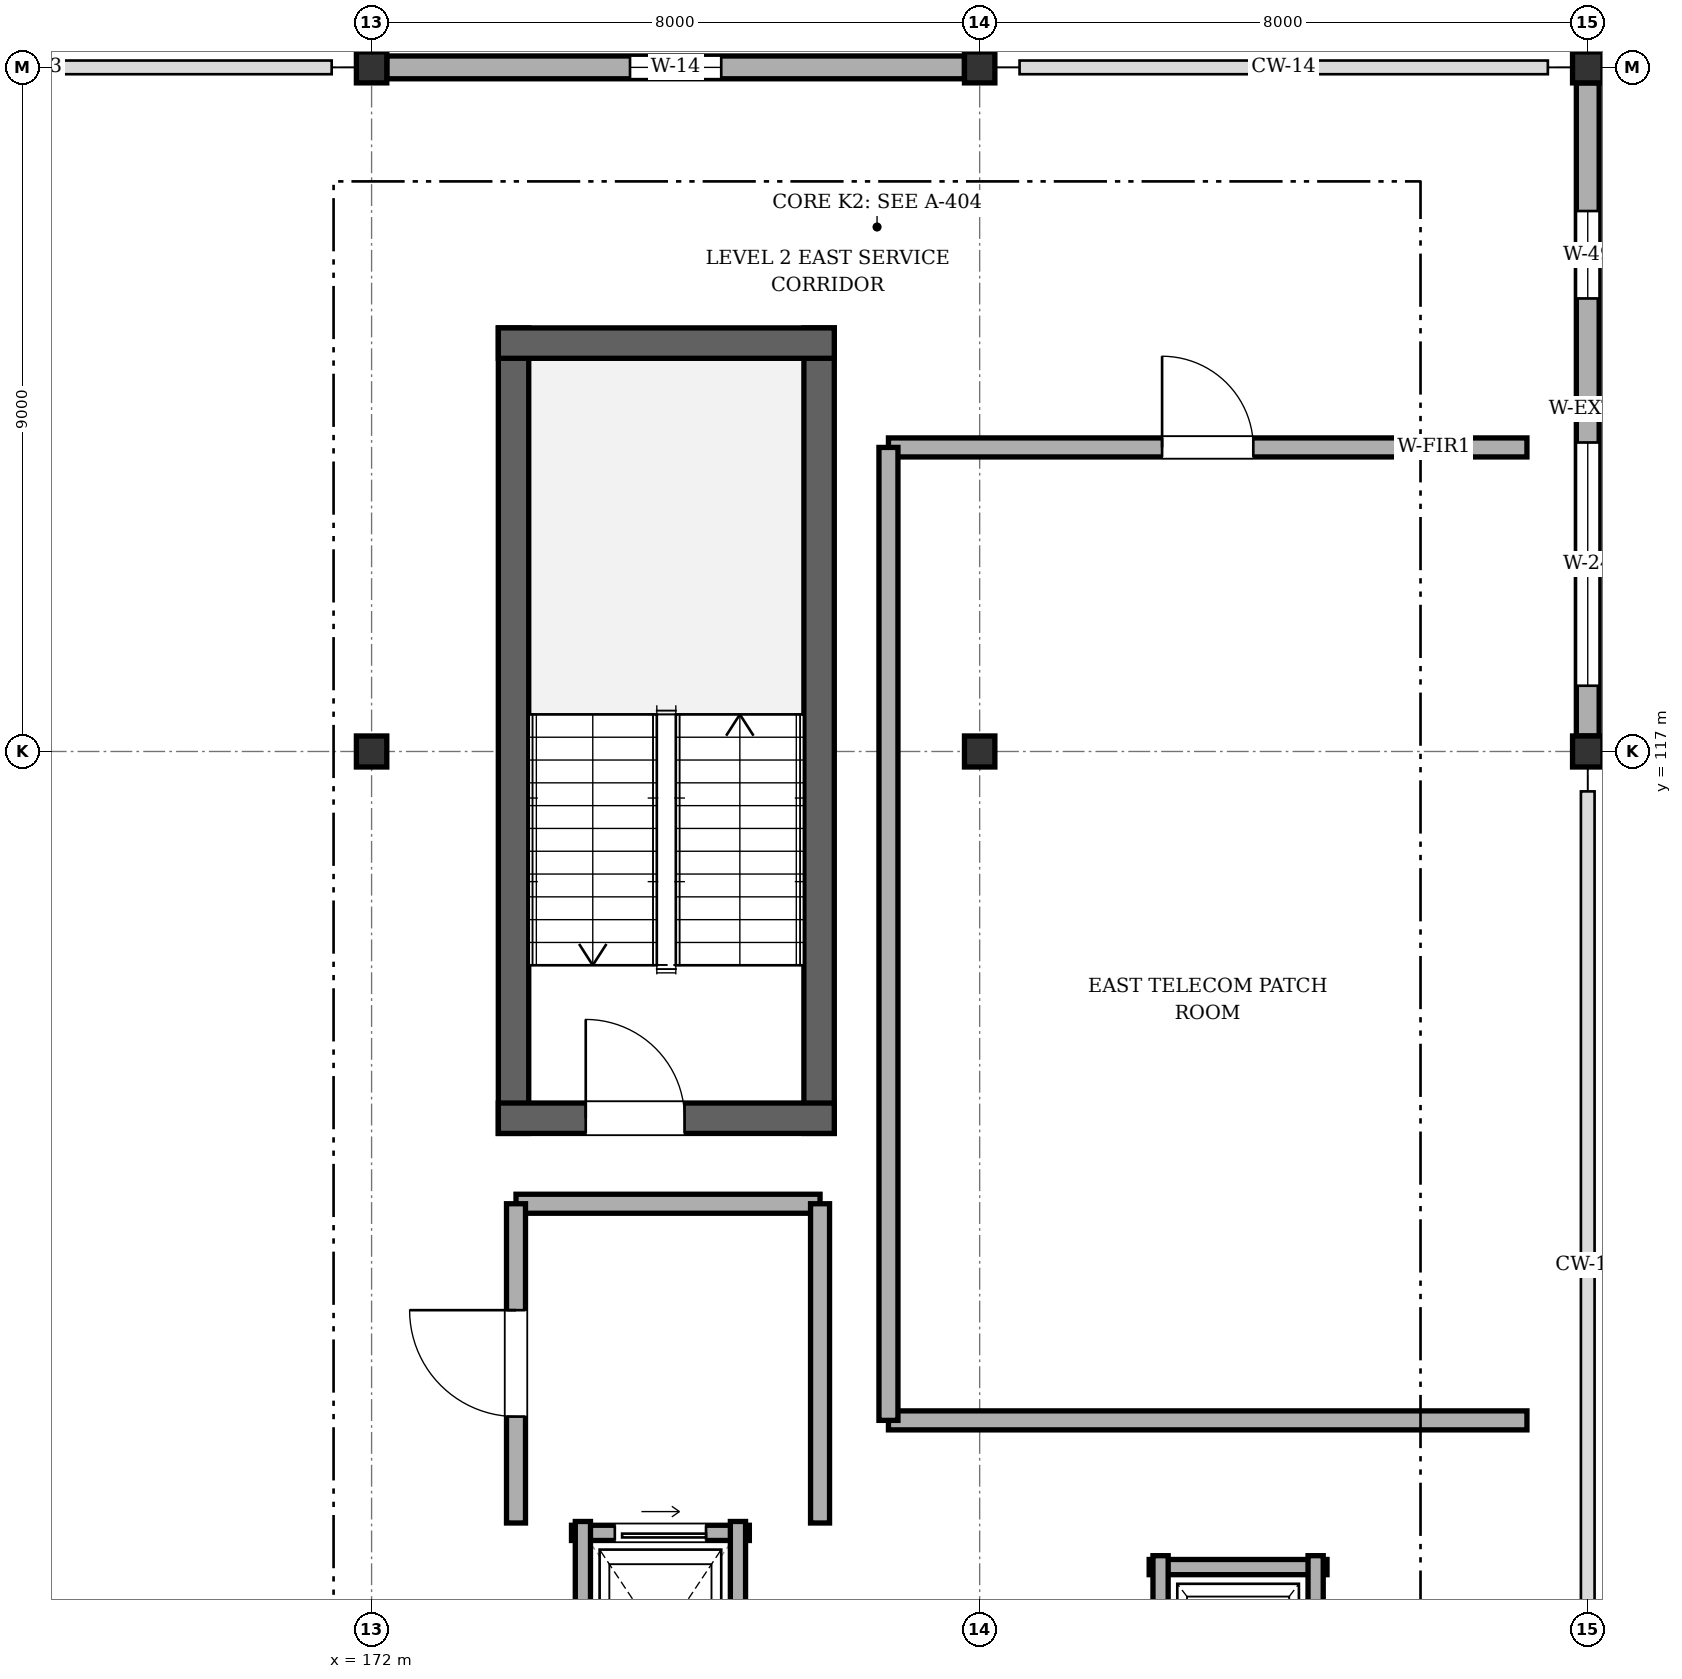
"""IFC4 building model, lengths in metres.
Left out: names, types, materials, properties, quantities, classifications, styles, units other than length and angle.
Written with IfcOpenShell. Run it as: python <this file> out.ifc"""

import sys

from ifc_helpers import new_model, si_unit, direction, frame, frame_2d, origin, origin_2d, place, context, subcontext, project, spatial, rectangle, i_section, extrude, element, fill, save


model = new_model("IFC4")
c1 = context("Model", 3, precision=1e-05, world=origin(), true_north=direction((0.0, 1.0)))
c2 = subcontext(c1, "Body", "Model", "MODEL_VIEW")
j1 = project(units=[si_unit("LENGTHUNIT", "METRE"), si_unit("PLANEANGLEUNIT", "RADIAN")], contexts=[c1])
p1 = place(None, origin())
s1 = spatial("IfcSite", under=j1, at=p1, CompositionType="ELEMENT")
p2 = place(p1, origin())
s2 = spatial("IfcBuilding", under=s1, at=p2, CompositionType="ELEMENT")
p3 = place(p2, frame((0.0, 0.0, 10.8)))
s3 = spatial("IfcBuildingStorey", under=s2, at=p3, CompositionType="ELEMENT", Elevation=10.8)
for number, where, z_axis, x_axis in (
    (1, (172.0, 117.0, 0.0), (0.0, 0.0, 1.0), (1.0, 0.0, 0.0)),
    (2, (172.0, 126.0, 0.0), (0.0, 0.0, 1.0), (1.0, 0.0, 0.0)),
    (3, (180.0, 117.0, 0.0), (0.0, 0.0, 1.0), (1.0, 0.0, 0.0)),
    (4, (180.0, 126.0, 0.0), (0.0, 0.0, 1.0), (1.0, 0.0, 0.0)),
    (5, (188.0, 117.0, 0.0), (0.0, 0.0, 1.0), (1.0, 0.0, 0.0)),
    (6, (188.0, 126.0, 0.0), (0.0, 0.0, 1.0), (1.0, 0.0, 0.0)),
):
    element("IfcColumn", number, at=place(p3, frame(where, z_axis=z_axis, x_axis=x_axis)), inside=s3, PredefinedType="COLUMN", context=c2, shape_type="SweptSolid", body=[
        extrude(i_section(OverallWidth=0.4, OverallDepth=0.408, WebThickness=0.021, FlangeThickness=0.021, FilletRadius=0.022, at=origin_2d()), origin(), (0.0, 0.0, 1.0), 3.6),
    ])
p4 = place(p3, frame((172.2, 126.0, 0.0), z_axis=(0.0, 0.0, 1.0), x_axis=(1.0, 0.0, 0.0)))
e7 = element("IfcWall", 7, at=p4, inside=s3, PredefinedType="SOLIDWALL", context=c2, shape_type="SweptSolid", body=[
    extrude(rectangle(XDim=7.6, YDim=0.3, at=frame_2d((3.8, 0.0))), origin(), (0.0, 0.0, 1.0), 2.895),
])
p5 = place(p4, frame((3.2, 0.0, 0.9)))
e8 = element("IfcOpeningElement", 8, at=p5, cuts=e7, PredefinedType="OPENING", context=c2, shape_type="SweptSolid", body=[
    extrude(rectangle(XDim=1.2, YDim=1.4, at=frame_2d((0.6, 0.7))), frame((0.0, 0.16, 0.0), z_axis=(0.0, -1.0, 0.0), x_axis=(1.0, 0.0, 0.0)), (0.0, 0.0, 1.0), 0.32),
])
p6 = place(p3, frame((188.0, 125.796, 0.0), z_axis=(0.0, 0.0, 1.0), x_axis=(0.0, -1.0, 0.0)))
e9 = element("IfcWall", 9, at=p6, inside=s3, PredefinedType="SOLIDWALL", context=c2, shape_type="SweptSolid", body=[
    extrude(rectangle(XDim=8.592, YDim=0.3, at=frame_2d((4.296, 0.0))), origin(), (0.0, 0.0, 1.0), 2.775),
])
p7 = place(p6, frame((1.686, 0.0, 0.9)))
e10 = element("IfcOpeningElement", 10, at=p7, cuts=e9, PredefinedType="OPENING", context=c2, shape_type="SweptSolid", body=[
    extrude(rectangle(XDim=1.15, YDim=1.45, at=frame_2d((0.575, 0.725))), frame((0.0, 0.16, 0.0), z_axis=(0.0, -1.0, 0.0), x_axis=(1.0, 0.0, 0.0)), (0.0, 0.0, 1.0), 0.32),
])
p8 = place(p6, frame((4.731, 0.0, 0.9)))
e11 = element("IfcOpeningElement", 11, at=p8, cuts=e9, PredefinedType="OPENING", context=c2, shape_type="SweptSolid", body=[
    extrude(rectangle(XDim=3.2, YDim=1.5, at=frame_2d((1.6, 0.75))), frame((0.0, 0.16, 0.0), z_axis=(0.0, -1.0, 0.0), x_axis=(1.0, 0.0, 0.0)), (0.0, 0.0, 1.0), 0.32),
])
for number, where, z_axis, x_axis in (
    (12, (177.887, 111.975, 0.0), (0.0, 0.0, 1.0), (0.0, 1.0, 0.0)),
    (13, (173.867, 122.573, 0.0), (0.0, 0.0, 1.0), (0.0, -1.0, 0.0)),
):
    element("IfcWall", number, at=place(p3, frame(where, z_axis=z_axis, x_axis=x_axis)), inside=s3, PredefinedType="SHEAR", context=c2, shape_type="SweptSolid", body=[
        extrude(rectangle(XDim=10.597, YDim=0.4, at=frame_2d((5.299, 0.0))), origin(), (0.0, 0.0, 1.0), 3.38),
    ])
p9 = place(p3, frame((178.087, 122.373, 0.0), z_axis=(0.0, 0.0, 1.0), x_axis=(-1.0, 0.0, 0.0)))
e14 = element("IfcWall", 14, at=p9, inside=s3, PredefinedType="SHEAR", context=c2, shape_type="SweptSolid", body=[
    extrude(rectangle(XDim=4.42, YDim=0.4, at=frame_2d((2.21, 0.0))), origin(), (0.0, 0.0, 1.0), 3.38),
])
p10 = place(p3, frame((173.667, 112.175, 0.0), z_axis=(0.0, 0.0, 1.0), x_axis=(1.0, 0.0, 0.0)))
e15 = element("IfcWall", 15, at=p10, inside=s3, PredefinedType="SHEAR", context=c2, shape_type="SweptSolid", body=[
    extrude(rectangle(XDim=4.42, YDim=0.4, at=frame_2d((2.21, 0.0))), origin(), (0.0, 0.0, 1.0), 3.38),
])
p11 = place(p10, frame((1.15, 0.0, 0.0)))
e16 = element("IfcOpeningElement", 16, at=p11, cuts=e15, PredefinedType="OPENING", context=c2, shape_type="SweptSolid", body=[
    extrude(rectangle(XDim=1.3, YDim=2.1, at=frame_2d((0.65, 1.05))), frame((0.0, 0.21, 0.0), z_axis=(0.0, -1.0, 0.0), x_axis=(1.0, 0.0, 0.0)), (0.0, 0.0, 1.0), 0.42),
])
p12 = place(p3, frame((176.97, 106.72, 0.0), z_axis=(0.0, 0.0, 1.0), x_axis=(-1.0, 0.0, 0.0)))
e17 = element("IfcWall", 17, at=p12, inside=s3, PredefinedType="SOLIDWALL", context=c2, shape_type="SweptSolid", body=[
    extrude(rectangle(XDim=2.34, YDim=0.2, at=frame_2d((1.17, 0.0))), origin(), (0.0, 0.0, 1.0), 3.355),
])
p13 = place(p12, frame((0.57, 0.0, 0.0)))
e18 = element("IfcOpeningElement", 18, at=p13, cuts=e17, PredefinedType="OPENING", context=c2, shape_type="SweptSolid", body=[
    extrude(rectangle(XDim=1.2, YDim=2.15, at=frame_2d((0.6, 1.075))), frame((0.0, 0.11, 0.0), z_axis=(0.0, -1.0, 0.0), x_axis=(1.0, 0.0, 0.0)), (0.0, 0.0, 1.0), 0.22),
])
for number, where, z_axis, x_axis in (
    (19, (174.78, 106.87, 0.0), (0.0, 0.0, 1.0), (0.0, -1.0, 0.0)),
    (20, (176.82, 103.73, 0.0), (0.0, 0.0, 1.0), (0.0, 1.0, 0.0)),
):
    element("IfcWall", number, at=place(p3, frame(where, z_axis=z_axis, x_axis=x_axis)), inside=s3, PredefinedType="SOLIDWALL", context=c2, shape_type="SweptSolid", body=[
        extrude(rectangle(XDim=3.14, YDim=0.2, at=frame_2d((1.57, 0.0))), origin(), (0.0, 0.0, 1.0), 2.915),
    ])
p14 = place(p3, frame((184.57, 106.27, 0.0), z_axis=(0.0, 0.0, 1.0), x_axis=(-1.0, 0.0, 0.0)))
e21 = element("IfcWall", 21, at=p14, inside=s3, PredefinedType="SOLIDWALL", context=c2, shape_type="SweptSolid", body=[
    extrude(rectangle(XDim=2.34, YDim=0.2, at=frame_2d((1.17, 0.0))), origin(), (0.0, 0.0, 1.0), 3.355),
])
for number, where, z_axis, x_axis in (
    (22, (182.38, 106.42, 0.0), (0.0, 0.0, 1.0), (0.0, -1.0, 0.0)),
    (23, (184.42, 103.58, 0.0), (0.0, 0.0, 1.0), (0.0, 1.0, 0.0)),
):
    element("IfcWall", number, at=place(p3, frame(where, z_axis=z_axis, x_axis=x_axis)), inside=s3, PredefinedType="SOLIDWALL", context=c2, shape_type="SweptSolid", body=[
        extrude(rectangle(XDim=2.84, YDim=0.2, at=frame_2d((1.42, 0.0))), origin(), (0.0, 0.0, 1.0), 2.915),
    ])
p15 = place(p3, frame((187.2, 108.2, 0.0), z_axis=(0.0, 0.0, 1.0), x_axis=(-1.0, 0.0, 0.0)))
e24 = element("IfcWall", 24, at=p15, inside=s3, PredefinedType="SOLIDWALL", context=c2, shape_type="SweptSolid", body=[
    extrude(rectangle(XDim=8.4, YDim=0.25, at=frame_2d((4.2, 0.0))), origin(), (0.0, 0.0, 1.0), 2.755),
])
p16 = place(p3, frame((178.8, 121.0, 0.0), z_axis=(0.0, 0.0, 1.0), x_axis=(1.0, 0.0, 0.0)))
e25 = element("IfcWall", 25, at=p16, inside=s3, PredefinedType="SOLIDWALL", context=c2, shape_type="SweptSolid", body=[
    extrude(rectangle(XDim=8.4, YDim=0.25, at=frame_2d((4.2, 0.0))), origin(), (0.0, 0.0, 1.0), 2.895),
])
p17 = place(p16, frame((3.6, 0.0, 0.0)))
e26 = element("IfcOpeningElement", 26, at=p17, cuts=e25, PredefinedType="OPENING", context=c2, shape_type="SweptSolid", body=[
    extrude(rectangle(XDim=1.2, YDim=2.1, at=frame_2d((0.6, 1.05))), frame((0.0, 0.135, 0.0), z_axis=(0.0, -1.0, 0.0), x_axis=(1.0, 0.0, 0.0)), (0.0, 0.0, 1.0), 0.27),
])
p18 = place(p3, frame((178.8, 108.2, 0.0), z_axis=(0.0, 0.0, 1.0), x_axis=(0.0, 1.0, 0.0)))
e27 = element("IfcWall", 27, at=p18, inside=s3, PredefinedType="SOLIDWALL", context=c2, shape_type="SweptSolid", body=[
    extrude(rectangle(XDim=12.8, YDim=0.25, at=frame_2d((6.4, 0.0))), origin(), (0.0, 0.0, 1.0), 3.355),
])
p19 = place(p3, frame((173.9, 111.05, 0.0), z_axis=(0.0, 0.0, 1.0), x_axis=(1.0, 0.0, 0.0)))
e28 = element("IfcWall", 28, at=p19, inside=s3, PredefinedType="SOLIDWALL", context=c2, shape_type="SweptSolid", body=[
    extrude(rectangle(XDim=4.0, YDim=0.25, at=frame_2d((2.0, 0.0))), origin(), (0.0, 0.0, 1.0), 3.355),
])
p20 = place(p3, frame((173.9, 106.85, 0.0), z_axis=(0.0, 0.0, 1.0), x_axis=(0.0, 1.0, 0.0)))
e29 = element("IfcWall", 29, at=p20, inside=s3, PredefinedType="SOLIDWALL", context=c2, shape_type="SweptSolid", body=[
    extrude(rectangle(XDim=4.2, YDim=0.25, at=frame_2d((2.1, 0.0))), origin(), (0.0, 0.0, 1.0), 3.355),
])
p21 = place(p20, frame((1.4, 0.0, 0.0)))
e30 = element("IfcOpeningElement", 30, at=p21, cuts=e29, PredefinedType="OPENING", context=c2, shape_type="SweptSolid", body=[
    extrude(rectangle(XDim=1.4, YDim=2.1, at=frame_2d((0.7, 1.05))), frame((0.0, 0.135, 0.0), z_axis=(0.0, -1.0, 0.0), x_axis=(1.0, 0.0, 0.0)), (0.0, 0.0, 1.0), 0.27),
])
p22 = place(p3, frame((177.9, 111.05, 0.0), z_axis=(0.0, 0.0, 1.0), x_axis=(0.0, -1.0, 0.0)))
e31 = element("IfcWall", 31, at=p22, inside=s3, PredefinedType="SOLIDWALL", context=c2, shape_type="SweptSolid", body=[
    extrude(rectangle(XDim=4.2, YDim=0.25, at=frame_2d((2.1, 0.0))), origin(), (0.0, 0.0, 1.0), 3.355),
])
p23 = place(p5, origin())
e32 = element("IfcWindow", 32, at=p23, inside=s3, PartitioningType="SINGLE_PANEL", PredefinedType="WINDOW", context=c2, shape_type="SweptSolid", body=[
    extrude(rectangle(XDim=1.2, YDim=1.4, at=frame_2d((0.6, 0.7))), frame((0.0, 0.03, 0.0), z_axis=(0.0, -1.0, 0.0), x_axis=(1.0, 0.0, 0.0)), (0.0, 0.0, 1.0), 0.06),
])
fill(e8, e32)
p24 = place(p7, origin())
e33 = element("IfcWindow", 33, at=p24, inside=s3, PartitioningType="SINGLE_PANEL", PredefinedType="WINDOW", context=c2, shape_type="SweptSolid", body=[
    extrude(rectangle(XDim=1.15, YDim=1.45, at=frame_2d((0.575, 0.725))), frame((0.0, 0.03, 0.0), z_axis=(0.0, -1.0, 0.0), x_axis=(1.0, 0.0, 0.0)), (0.0, 0.0, 1.0), 0.06),
])
fill(e10, e33)
p25 = place(p8, origin())
e34 = element("IfcWindow", 34, at=p25, inside=s3, PartitioningType="SINGLE_PANEL", PredefinedType="WINDOW", context=c2, shape_type="SweptSolid", body=[
    extrude(rectangle(XDim=3.2, YDim=1.5, at=frame_2d((1.6, 0.75))), frame((0.0, 0.03, 0.0), z_axis=(0.0, -1.0, 0.0), x_axis=(1.0, 0.0, 0.0)), (0.0, 0.0, 1.0), 0.06),
])
fill(e11, e34)
p26 = place(p11, origin())
e35 = element("IfcDoor", 35, at=p26, inside=s3, OperationType="SINGLE_SWING_LEFT", PredefinedType="DOOR", context=c2, shape_type="SweptSolid", body=[
    extrude(rectangle(XDim=1.3, YDim=2.1, at=frame_2d((0.65, 1.05))), frame((0.0, 0.025, 0.0), z_axis=(0.0, -1.0, 0.0), x_axis=(1.0, 0.0, 0.0)), (0.0, 0.0, 1.0), 0.05),
])
fill(e16, e35)
p27 = place(p13, origin())
e36 = element("IfcDoor", 36, at=p27, inside=s3, OperationType="SLIDING_TO_LEFT", PredefinedType="DOOR", context=c2, shape_type="SweptSolid", body=[
    extrude(rectangle(XDim=1.2, YDim=2.15, at=frame_2d((0.6, 1.075))), frame((0.0, 0.025, 0.0), z_axis=(0.0, -1.0, 0.0), x_axis=(1.0, 0.0, 0.0)), (0.0, 0.0, 1.0), 0.05),
])
fill(e18, e36)
p28 = place(p17, origin())
e37 = element("IfcDoor", 37, at=p28, inside=s3, OperationType="SINGLE_SWING_LEFT", PredefinedType="DOOR", context=c2, shape_type="SweptSolid", body=[
    extrude(rectangle(XDim=1.2, YDim=2.1, at=frame_2d((0.6, 1.05))), frame((0.0, 0.025, 0.0), z_axis=(0.0, -1.0, 0.0), x_axis=(1.0, 0.0, 0.0)), (0.0, 0.0, 1.0), 0.05),
])
fill(e26, e37)
p29 = place(p21, origin())
e38 = element("IfcDoor", 38, at=p29, inside=s3, OperationType="SINGLE_SWING_RIGHT", PredefinedType="DOOR", context=c2, shape_type="SweptSolid", body=[
    extrude(rectangle(XDim=1.4, YDim=2.1, at=frame_2d((0.7, 1.05))), frame((0.0, 0.025, 0.0), z_axis=(0.0, -1.0, 0.0), x_axis=(1.0, 0.0, 0.0)), (0.0, 0.0, 1.0), 0.05),
])
fill(e30, e38)
save(model, sys.argv[1])
